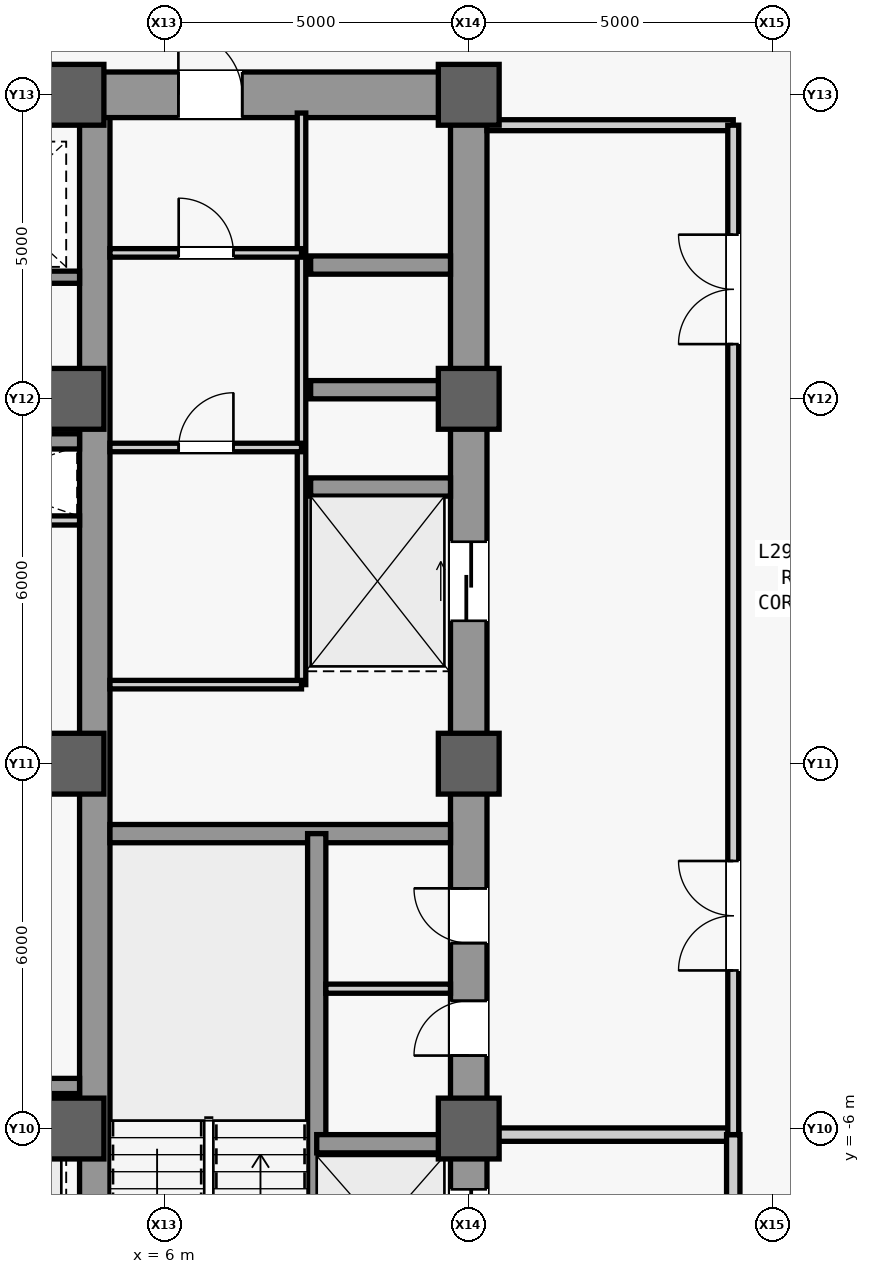
"""IFC4 building model, lengths in metres.
Left out: names, types, materials, properties, quantities, classifications, styles, units other than length and angle.
Written with IfcOpenShell. Run it as: python <this file> out.ifc"""

import sys

from ifc_helpers import new_model, si_unit, direction, frame, frame_2d, origin, origin_2d, place, context, subcontext, project, spatial, rectangle, extrude, source, transform, mapped, element, fill, save


model = new_model("IFC4")
c1 = context("Model", 3, precision=1e-05, world=origin(), true_north=direction((0.0, 1.0)))
c2 = subcontext(c1, "Body", "Model", "MODEL_VIEW")
j1 = project(units=[si_unit("LENGTHUNIT", "METRE"), si_unit("PLANEANGLEUNIT", "RADIAN")], contexts=[c1])
p1 = place(None, origin())
s1 = spatial("IfcSite", under=j1, at=p1, CompositionType="ELEMENT")
p2 = place(p1, origin())
s2 = spatial("IfcBuilding", under=s1, at=p2, CompositionType="ELEMENT")
p3 = place(p2, frame((0.0, 0.0, 128.3)))
s3 = spatial("IfcBuildingStorey", under=s2, at=p3, CompositionType="ELEMENT", Elevation=128.3)
m1 = source(origin(), c2, "Body", "SweptSolid", [
    extrude(rectangle(XDim=22.0, YDim=0.6, at=frame_2d((11.0, 0.0))), origin(), (0.0, 0.0, 1.0), 3.84),
])
p4 = place(p3, frame((11.0, -11.0, 0.0), z_axis=(0.0, 0.0, 1.0), x_axis=(0.0, 1.0, 0.0)))
e1 = element("IfcWall", 1, at=p4, inside=s3, PredefinedType="SHEAR", context=c2, shape_type="MappedRepresentation", body=[
    mapped(m1, transform((0.0, 0.0, 0.0), scale=1.0)),
])
m2 = source(origin(), c2, "Body", "SweptSolid", [
    extrude(rectangle(XDim=1.1, YDim=2.2, at=frame_2d((0.55, 1.1))), frame((0.0, 0.31, 0.0), z_axis=(0.0, -1.0, 0.0), x_axis=(1.0, 0.0, 0.0)), (0.0, 0.0, 1.0), 0.62),
])
p5 = place(p4, frame((0.8, 0.0, 0.0)))
e2 = element("IfcOpeningElement", 2, at=p5, cuts=e1, PredefinedType="OPENING", context=c2, shape_type="MappedRepresentation", body=[
    mapped(m2, transform((0.0, 0.0, 0.0), scale=1.0)),
])
m3 = source(origin(), c2, "Body", "SweptSolid", [
    extrude(rectangle(XDim=0.9, YDim=2.15, at=frame_2d((0.45, 1.075))), frame((0.0, 0.31, 0.0), z_axis=(0.0, -1.0, 0.0), x_axis=(1.0, 0.0, 0.0)), (0.0, 0.0, 1.0), 0.62),
])
p6 = place(p4, frame((6.2, 0.0, 0.0)))
e3 = element("IfcOpeningElement", 3, at=p6, cuts=e1, PredefinedType="OPENING", context=c2, shape_type="MappedRepresentation", body=[
    mapped(m3, transform((0.0, 0.0, 0.0), scale=1.0)),
])
p7 = place(p4, frame((8.05, 0.0, 0.0)))
e4 = element("IfcOpeningElement", 4, at=p7, cuts=e1, PredefinedType="OPENING", context=c2, shape_type="MappedRepresentation", body=[
    mapped(m3, transform((0.0, 0.0, 0.0), scale=1.0)),
])
m4 = source(origin(), c2, "Body", "SweptSolid", [
    extrude(rectangle(XDim=1.3, YDim=2.3, at=frame_2d((0.65, 1.15))), frame((0.0, 0.31, 0.0), z_axis=(0.0, -1.0, 0.0), x_axis=(1.0, 0.0, 0.0)), (0.0, 0.0, 1.0), 0.62),
])
p8 = place(p4, frame((2.7, 0.0, 0.0)))
e5 = element("IfcOpeningElement", 5, at=p8, cuts=e1, PredefinedType="OPENING", context=c2, shape_type="MappedRepresentation", body=[
    mapped(m4, transform((0.0, 0.0, 0.0), scale=1.0)),
])
p9 = place(p4, frame((13.35, 0.0, 0.0)))
e6 = element("IfcOpeningElement", 6, at=p9, cuts=e1, PredefinedType="OPENING", context=c2, shape_type="MappedRepresentation", body=[
    mapped(m4, transform((0.0, 0.0, 0.0), scale=1.0)),
])
m5 = source(origin(), c2, "Body", "SweptSolid", [
    extrude(rectangle(XDim=21.4, YDim=0.5, at=frame_2d((10.7, 0.0))), origin(), (0.0, 0.0, 1.0), 3.84),
])
p10 = place(p3, frame((4.85, -10.7, 0.0), z_axis=(0.0, 0.0, 1.0), x_axis=(0.0, 1.0, 0.0)))
e7 = element("IfcWall", 7, at=p10, inside=s3, PredefinedType="SHEAR", context=c2, shape_type="MappedRepresentation", body=[
    mapped(m5, transform((0.0, 0.0, 0.0), scale=1.0)),
])
m6 = source(origin(), c2, "Body", "SweptSolid", [
    extrude(rectangle(XDim=5.85, YDim=0.75, at=frame_2d((2.925, 0.0))), origin(), (0.0, 0.0, 1.0), 3.84),
])
p11 = place(p3, frame((4.85, 11.0, 0.0), z_axis=(0.0, 0.0, 1.0), x_axis=(1.0, 0.0, 0.0)))
e8 = element("IfcWall", 8, at=p11, inside=s3, PredefinedType="SHEAR", context=c2, shape_type="MappedRepresentation", body=[
    mapped(m6, transform((0.0, 0.0, 0.0), scale=1.0)),
])
m7 = source(origin(), c2, "Body", "SweptSolid", [
    extrude(rectangle(XDim=1.05, YDim=2.2, at=frame_2d((0.525, 1.1))), frame((0.0, 0.385, 0.0), z_axis=(0.0, -1.0, 0.0), x_axis=(1.0, 0.0, 0.0)), (0.0, 0.0, 1.0), 0.77),
])
p12 = place(p11, frame((1.375, 0.0, 0.0)))
e9 = element("IfcOpeningElement", 9, at=p12, cuts=e8, PredefinedType="OPENING", context=c2, shape_type="MappedRepresentation", body=[
    mapped(m7, transform((0.0, 0.0, 0.0), scale=1.0)),
])
m8 = source(origin(), c2, "Body", "SweptSolid", [
    extrude(rectangle(XDim=5.6, YDim=0.3, at=frame_2d((2.8, 0.0))), origin(), (0.0, 0.0, 1.0), 3.84),
])
p13 = place(p3, frame((5.1, -1.15, 0.0), z_axis=(0.0, 0.0, 1.0), x_axis=(1.0, 0.0, 0.0)))
e10 = element("IfcWall", 10, at=p13, inside=s3, PredefinedType="SHEAR", context=c2, shape_type="MappedRepresentation", body=[
    mapped(m8, transform((0.0, 0.0, 0.0), scale=1.0)),
])
m9 = source(origin(), c2, "Body", "SweptSolid", [
    extrude(rectangle(XDim=9.2, YDim=0.5, at=frame_2d((4.6, 0.0))), origin(), (0.0, 0.0, 1.0), 3.84),
])
p14 = place(p3, frame((-4.6, 11.0, 0.0), z_axis=(0.0, 0.0, 1.0), x_axis=(1.0, 0.0, 0.0)))
e11 = element("IfcWall", 11, at=p14, inside=s3, PredefinedType="SHEAR", context=c2, shape_type="MappedRepresentation", body=[
    mapped(m9, transform((0.0, 0.0, 0.0), scale=1.0)),
])
m10 = source(origin(), c2, "Body", "SweptSolid", [
    extrude(rectangle(XDim=1.8, YDim=2.25, at=frame_2d((0.9, 1.125))), frame((0.0, 0.26, 0.0), z_axis=(0.0, -1.0, 0.0), x_axis=(1.0, 0.0, 0.0)), (0.0, 0.0, 1.0), 0.52),
])
p15 = place(p14, frame((3.7, 0.0, 0.0)))
e12 = element("IfcOpeningElement", 12, at=p15, cuts=e11, PredefinedType="OPENING", context=c2, shape_type="MappedRepresentation", body=[
    mapped(m10, transform((0.0, 0.0, 0.0), scale=1.0)),
])
m11 = source(origin(), c2, "Body", "SweptSolid", [
    extrude(rectangle(XDim=1.0, YDim=1.0, at=origin_2d()), origin(), (0.0, 0.0, 1.0), 4.1),
])
for number, where, z_axis, x_axis in (
    (13, (4.5, -6.0, 0.0), (0.0, 0.0, 1.0), (1.0, 0.0, 0.0)),
    (14, (4.5, 0.0, 0.0), (0.0, 0.0, 1.0), (1.0, 0.0, 0.0)),
    (15, (4.5, 6.0, 0.0), (0.0, 0.0, 1.0), (1.0, 0.0, 0.0)),
    (16, (4.5, 11.0, 0.0), (0.0, 0.0, 1.0), (1.0, 0.0, 0.0)),
    (17, (11.0, -6.0, 0.0), (0.0, 0.0, 1.0), (1.0, 0.0, 0.0)),
    (18, (11.0, 0.0, 0.0), (0.0, 0.0, 1.0), (1.0, 0.0, 0.0)),
    (19, (11.0, 6.0, 0.0), (0.0, 0.0, 1.0), (1.0, 0.0, 0.0)),
    (20, (11.0, 11.0, 0.0), (0.0, 0.0, 1.0), (1.0, 0.0, 0.0)),
):
    element("IfcColumn", number, at=place(p3, frame(where, z_axis=z_axis, x_axis=x_axis)), inside=s3, PredefinedType="COLUMN", context=c2, shape_type="MappedRepresentation", body=[
        mapped(m11, transform((0.0, 0.0, 0.0), scale=1.0)),
    ])
m12 = source(origin(), c2, "Body", "SweptSolid", [
    extrude(rectangle(XDim=7.8, YDim=0.3, at=frame_2d((3.9, 0.0))), origin(), (0.0, 0.0, 1.0), 3.84),
])
p16 = place(p3, frame((8.5, -8.95, 0.0), z_axis=(0.0, 0.0, 1.0), x_axis=(0.0, 1.0, 0.0)))
e21 = element("IfcWall", 21, at=p16, inside=s3, PredefinedType="SHEAR", context=c2, shape_type="MappedRepresentation", body=[
    mapped(m12, transform((0.0, 0.0, 0.0), scale=1.0)),
])
m13 = source(origin(), c2, "Body", "SweptSolid", [
    extrude(rectangle(XDim=2.2, YDim=0.3, at=frame_2d((1.1, 0.0))), origin(), (0.0, 0.0, 1.0), 3.84),
])
p17 = place(p3, frame((8.5, -6.25, 0.0), z_axis=(0.0, 0.0, 1.0), x_axis=(1.0, 0.0, 0.0)))
e22 = element("IfcWall", 22, at=p17, inside=s3, PredefinedType="SHEAR", context=c2, shape_type="MappedRepresentation", body=[
    mapped(m13, transform((0.0, 0.0, 0.0), scale=1.0)),
])
m14 = source(origin(), c2, "Body", "SweptSolid", [
    extrude(rectangle(XDim=2.3, YDim=0.3, at=frame_2d((1.15, 0.0))), origin(), (0.0, 0.0, 1.0), 3.84),
])
for number, where, z_axis, x_axis in (
    (23, (8.4, 4.55, 0.0), (0.0, 0.0, 1.0), (1.0, 0.0, 0.0)),
    (24, (8.4, 6.15, 0.0), (0.0, 0.0, 1.0), (1.0, 0.0, 0.0)),
    (25, (8.4, 8.2, 0.0), (0.0, 0.0, 1.0), (1.0, 0.0, 0.0)),
):
    element("IfcWall", number, at=place(p3, frame(where, z_axis=z_axis, x_axis=x_axis)), inside=s3, PredefinedType="SHEAR", context=c2, shape_type="MappedRepresentation", body=[
        mapped(m14, transform((0.0, 0.0, 0.0), scale=1.0)),
    ])
m15 = source(origin(), c2, "Body", "SweptSolid", [
    extrude(rectangle(XDim=2.05, YDim=0.15, at=frame_2d((1.025, 0.0))), origin(), (0.0, 0.0, 1.0), 3.84),
])
p18 = place(p3, frame((8.65, -3.7, 0.0), z_axis=(0.0, 0.0, 1.0), x_axis=(1.0, 0.0, 0.0)))
e26 = element("IfcWall", 26, at=p18, inside=s3, PredefinedType="PARTITIONING", context=c2, shape_type="MappedRepresentation", body=[
    mapped(m15, transform((0.0, 0.0, 0.0), scale=1.0)),
])
m16 = source(origin(), c2, "Body", "SweptSolid", [
    extrude(rectangle(XDim=9.4, YDim=0.14, at=frame_2d((4.7, 0.0))), origin(), (0.0, 0.0, 1.0), 3.84),
])
p19 = place(p3, frame((8.25, 1.3, 0.0), z_axis=(0.0, 0.0, 1.0), x_axis=(0.0, 1.0, 0.0)))
e27 = element("IfcWall", 27, at=p19, inside=s3, PredefinedType="PARTITIONING", context=c2, shape_type="MappedRepresentation", body=[
    mapped(m16, transform((0.0, 0.0, 0.0), scale=1.0)),
])
m17 = source(origin(), c2, "Body", "SweptSolid", [
    extrude(rectangle(XDim=3.15, YDim=0.14, at=frame_2d((1.575, 0.0))), origin(), (0.0, 0.0, 1.0), 3.84),
])
p20 = place(p3, frame((5.1, 1.3, 0.0), z_axis=(0.0, 0.0, 1.0), x_axis=(1.0, 0.0, 0.0)))
e28 = element("IfcWall", 28, at=p20, inside=s3, PredefinedType="PARTITIONING", context=c2, shape_type="MappedRepresentation", body=[
    mapped(m17, transform((0.0, 0.0, 0.0), scale=1.0)),
])
p21 = place(p3, frame((5.1, 8.4, 0.0), z_axis=(0.0, 0.0, 1.0), x_axis=(1.0, 0.0, 0.0)))
e29 = element("IfcWall", 29, at=p21, inside=s3, PredefinedType="PARTITIONING", context=c2, shape_type="MappedRepresentation", body=[
    mapped(m17, transform((0.0, 0.0, 0.0), scale=1.0)),
])
m18 = source(origin(), c2, "Body", "SweptSolid", [
    extrude(rectangle(XDim=0.9, YDim=2.15, at=frame_2d((0.45, 1.075))), frame((0.0, 0.08, 0.0), z_axis=(0.0, -1.0, 0.0), x_axis=(1.0, 0.0, 0.0)), (0.0, 0.0, 1.0), 0.16),
])
p22 = place(p21, frame((1.13, 0.0, 0.0)))
e30 = element("IfcOpeningElement", 30, at=p22, cuts=e29, PredefinedType="OPENING", context=c2, shape_type="MappedRepresentation", body=[
    mapped(m18, transform((0.0, 0.0, 0.0), scale=1.0)),
])
p23 = place(p3, frame((5.1, 5.2, 0.0), z_axis=(0.0, 0.0, 1.0), x_axis=(1.0, 0.0, 0.0)))
e31 = element("IfcWall", 31, at=p23, inside=s3, PredefinedType="PARTITIONING", context=c2, shape_type="MappedRepresentation", body=[
    mapped(m17, transform((0.0, 0.0, 0.0), scale=1.0)),
])
p24 = place(p23, frame((1.13, 0.0, 0.0)))
e32 = element("IfcOpeningElement", 32, at=p24, cuts=e31, PredefinedType="OPENING", context=c2, shape_type="MappedRepresentation", body=[
    mapped(m18, transform((0.0, 0.0, 0.0), scale=1.0)),
])
m19 = source(origin(), c2, "Body", "SweptSolid", [
    extrude(rectangle(XDim=4.05, YDim=0.22, at=frame_2d((2.025, 0.0))), origin(), (0.0, 0.0, 1.0), 3.067),
])
p25 = place(p3, frame((11.3, -6.1, 0.0), z_axis=(0.0, 0.0, 1.0), x_axis=(1.0, 0.0, 0.0)))
e33 = element("IfcWall", 33, at=p25, inside=s3, PredefinedType="PARTITIONING", context=c2, shape_type="MappedRepresentation", body=[
    mapped(m19, transform((0.0, 0.0, 0.0), scale=1.0)),
])
m20 = source(origin(), c2, "Body", "SweptSolid", [
    extrude(rectangle(XDim=4.4, YDim=0.22, at=frame_2d((2.2, 0.0))), origin(), (0.0, 0.0, 1.0), 3.84),
])
p26 = place(p3, frame((15.35, -10.5, 0.0), z_axis=(0.0, 0.0, 1.0), x_axis=(0.0, 1.0, 0.0)))
e34 = element("IfcWall", 34, at=p26, inside=s3, PredefinedType="PARTITIONING", context=c2, shape_type="MappedRepresentation", body=[
    mapped(m20, transform((0.0, 0.0, 0.0), scale=1.0)),
])
m21 = source(origin(), c2, "Body", "SweptSolid", [
    extrude(rectangle(XDim=1.2, YDim=2.2, at=frame_2d((0.6, 1.1))), frame((0.0, 0.12, 0.0), z_axis=(0.0, -1.0, 0.0), x_axis=(1.0, 0.0, 0.0)), (0.0, 0.0, 1.0), 0.24),
])
p27 = place(p26, frame((1.6, 0.0, 0.0)))
e35 = element("IfcOpeningElement", 35, at=p27, cuts=e34, PredefinedType="OPENING", context=c2, shape_type="MappedRepresentation", body=[
    mapped(m21, transform((0.0, 0.0, 0.0), scale=1.0)),
])
m22 = source(origin(), c2, "Body", "SweptSolid", [
    extrude(rectangle(XDim=4.05, YDim=0.18, at=frame_2d((2.025, 0.0))), origin(), (0.0, 0.0, 1.0), 3.84),
])
p28 = place(p3, frame((11.3, 10.5, 0.0), z_axis=(0.0, 0.0, 1.0), x_axis=(1.0, 0.0, 0.0)))
e36 = element("IfcWall", 36, at=p28, inside=s3, PredefinedType="PARTITIONING", context=c2, shape_type="MappedRepresentation", body=[
    mapped(m22, transform((0.0, 0.0, 0.0), scale=1.0)),
])
m23 = source(origin(), c2, "Body", "SweptSolid", [
    extrude(rectangle(XDim=16.6, YDim=0.18, at=frame_2d((8.3, 0.0))), origin(), (0.0, 0.0, 1.0), 3.84),
])
p29 = place(p3, frame((15.35, -6.1, 0.0), z_axis=(0.0, 0.0, 1.0), x_axis=(0.0, 1.0, 0.0)))
e37 = element("IfcWall", 37, at=p29, inside=s3, PredefinedType="PARTITIONING", context=c2, shape_type="MappedRepresentation", body=[
    mapped(m23, transform((0.0, 0.0, 0.0), scale=1.0)),
])
m24 = source(origin(), c2, "Body", "SweptSolid", [
    extrude(rectangle(XDim=1.8, YDim=2.25, at=frame_2d((0.9, 1.125))), frame((0.0, 0.1, 0.0), z_axis=(0.0, -1.0, 0.0), x_axis=(1.0, 0.0, 0.0)), (0.0, 0.0, 1.0), 0.2),
])
p30 = place(p29, frame((2.7, 0.0, 0.0)))
e38 = element("IfcOpeningElement", 38, at=p30, cuts=e37, PredefinedType="OPENING", context=c2, shape_type="MappedRepresentation", body=[
    mapped(m24, transform((0.0, 0.0, 0.0), scale=1.0)),
])
p31 = place(p29, frame((13.0, 0.0, 0.0)))
e39 = element("IfcOpeningElement", 39, at=p31, cuts=e37, PredefinedType="OPENING", context=c2, shape_type="MappedRepresentation", body=[
    mapped(m24, transform((0.0, 0.0, 0.0), scale=1.0)),
])
m25 = source(origin(), c2, "Body", "SweptSolid", [
    extrude(rectangle(XDim=3.45, YDim=0.15, at=frame_2d((1.725, 0.0))), origin(), (0.0, 0.0, 1.0), 3.84),
])
p32 = place(p3, frame((1.15, 4.0, 0.0), z_axis=(0.0, 0.0, 1.0), x_axis=(1.0, 0.0, 0.0)))
e40 = element("IfcWall", 40, at=p32, inside=s3, PredefinedType="PARTITIONING", context=c2, shape_type="MappedRepresentation", body=[
    mapped(m25, transform((0.0, 0.0, 0.0), scale=1.0)),
])
m26 = source(origin(), c2, "Body", "SweptSolid", [
    extrude(rectangle(XDim=9.2, YDim=0.25, at=frame_2d((4.6, 0.0))), origin(), (0.0, 0.0, 1.0), 3.84),
])
p33 = place(p3, frame((-4.6, -5.3, 0.0), z_axis=(0.0, 0.0, 1.0), x_axis=(1.0, 0.0, 0.0)))
e41 = element("IfcWall", 41, at=p33, inside=s3, PredefinedType="SHEAR", context=c2, shape_type="MappedRepresentation", body=[
    mapped(m26, transform((0.0, 0.0, 0.0), scale=1.0)),
])
m27 = source(origin(), c2, "Body", "SweptSolid", [
    extrude(rectangle(XDim=1.05, YDim=2.2, at=frame_2d((0.525, 1.1))), frame((0.0, 0.135, 0.0), z_axis=(0.0, -1.0, 0.0), x_axis=(1.0, 0.0, 0.0)), (0.0, 0.0, 1.0), 0.27),
])
p34 = place(p33, frame((4.075, 0.0, 0.0)))
e42 = element("IfcOpeningElement", 42, at=p34, cuts=e41, PredefinedType="OPENING", context=c2, shape_type="MappedRepresentation", body=[
    mapped(m27, transform((0.0, 0.0, 0.0), scale=1.0)),
])
m28 = source(origin(), c2, "Body", "SweptSolid", [
    extrude(rectangle(XDim=2.45, YDim=0.2, at=frame_2d((1.225, 0.0))), origin(), (0.0, 0.0, 1.0), 3.84),
])
p35 = place(p3, frame((2.15, 8.0, 0.0), z_axis=(0.0, 0.0, 1.0), x_axis=(1.0, 0.0, 0.0)))
e43 = element("IfcWall", 43, at=p35, inside=s3, PredefinedType="SHEAR", context=c2, shape_type="MappedRepresentation", body=[
    mapped(m28, transform((0.0, 0.0, 0.0), scale=1.0)),
])
p36 = place(p3, frame((-4.6, 5.3, 0.0), z_axis=(0.0, 0.0, 1.0), x_axis=(1.0, 0.0, 0.0)))
e44 = element("IfcWall", 44, at=p36, inside=s3, PredefinedType="SHEAR", context=c2, shape_type="MappedRepresentation", body=[
    mapped(m26, transform((0.0, 0.0, 0.0), scale=1.0)),
])
p37 = place(p36, frame((4.075, 0.0, 0.0)))
e45 = element("IfcOpeningElement", 45, at=p37, cuts=e44, PredefinedType="OPENING", context=c2, shape_type="MappedRepresentation", body=[
    mapped(m27, transform((0.0, 0.0, 0.0), scale=1.0)),
])
m29 = source(origin(), c2, "Body", "SweptSolid", [
    extrude(rectangle(XDim=0.9, YDim=2.15, at=frame_2d((0.45, 1.075))), frame((0.0, 0.025, 0.0), z_axis=(0.0, -1.0, 0.0), x_axis=(1.0, 0.0, 0.0)), (0.0, 0.0, 1.0), 0.05),
])
p38 = place(p6, origin())
e46 = element("IfcDoor", 46, at=p38, inside=s3, OperationType="SINGLE_SWING_LEFT", PredefinedType="DOOR", context=c2, shape_type="MappedRepresentation", body=[
    mapped(m29, transform((0.0, 0.0, 0.0), scale=1.0)),
])
fill(e3, e46)
p39 = place(p7, origin())
e47 = element("IfcDoor", 47, at=p39, inside=s3, OperationType="SINGLE_SWING_RIGHT", PredefinedType="DOOR", context=c2, shape_type="MappedRepresentation", body=[
    mapped(m29, transform((0.0, 0.0, 0.0), scale=1.0)),
])
fill(e4, e47)
m30 = source(origin(), c2, "Body", "SweptSolid", [
    extrude(rectangle(XDim=1.05, YDim=2.2, at=frame_2d((0.525, 1.1))), frame((0.0, 0.025, 0.0), z_axis=(0.0, -1.0, 0.0), x_axis=(1.0, 0.0, 0.0)), (0.0, 0.0, 1.0), 0.05),
])
p40 = place(p12, origin())
e48 = element("IfcDoor", 48, at=p40, inside=s3, OperationType="SINGLE_SWING_LEFT", PredefinedType="DOOR", context=c2, shape_type="MappedRepresentation", body=[
    mapped(m30, transform((0.0, 0.0, 0.0), scale=1.0)),
])
fill(e9, e48)
p41 = place(p22, origin())
e49 = element("IfcDoor", 49, at=p41, inside=s3, OperationType="SINGLE_SWING_LEFT", PredefinedType="DOOR", context=c2, shape_type="MappedRepresentation", body=[
    mapped(m29, transform((0.0, 0.0, 0.0), scale=1.0)),
])
fill(e30, e49)
p42 = place(p24, origin())
e50 = element("IfcDoor", 50, at=p42, inside=s3, OperationType="SINGLE_SWING_RIGHT", PredefinedType="DOOR", context=c2, shape_type="MappedRepresentation", body=[
    mapped(m29, transform((0.0, 0.0, 0.0), scale=1.0)),
])
fill(e32, e50)
m31 = source(origin(), c2, "Body", "SweptSolid", [
    extrude(rectangle(XDim=1.8, YDim=2.25, at=frame_2d((0.9, 1.125))), frame((0.0, 0.025, 0.0), z_axis=(0.0, -1.0, 0.0), x_axis=(1.0, 0.0, 0.0)), (0.0, 0.0, 1.0), 0.05),
])
p43 = place(p30, origin())
e51 = element("IfcDoor", 51, at=p43, inside=s3, OperationType="SINGLE_SWING_RIGHT", PredefinedType="DOOR", context=c2, shape_type="MappedRepresentation", body=[
    mapped(m31, transform((0.0, 0.0, 0.0), scale=1.0)),
])
fill(e38, e51)
p44 = place(p31, origin())
e52 = element("IfcDoor", 52, at=p44, inside=s3, OperationType="SINGLE_SWING_LEFT", PredefinedType="DOOR", context=c2, shape_type="MappedRepresentation", body=[
    mapped(m31, transform((0.0, 0.0, 0.0), scale=1.0)),
])
fill(e39, e52)
m32 = source(origin(), c2, "Body", "SweptSolid", [
    extrude(rectangle(XDim=1.3, YDim=2.3, at=frame_2d((0.65, 1.15))), frame((0.0, 0.025, 0.0), z_axis=(0.0, -1.0, 0.0), x_axis=(1.0, 0.0, 0.0)), (0.0, 0.0, 1.0), 0.05),
])
p45 = place(p8, origin())
e53 = element("IfcDoor", 53, at=p45, inside=s3, OperationType="SLIDING_TO_LEFT", PredefinedType="DOOR", context=c2, shape_type="MappedRepresentation", body=[
    mapped(m32, transform((0.0, 0.0, 0.0), scale=1.0)),
])
fill(e5, e53)
p46 = place(p9, origin())
e54 = element("IfcDoor", 54, at=p46, inside=s3, OperationType="SLIDING_TO_LEFT", PredefinedType="DOOR", context=c2, shape_type="MappedRepresentation", body=[
    mapped(m32, transform((0.0, 0.0, 0.0), scale=1.0)),
])
fill(e6, e54)
save(model, sys.argv[1])
